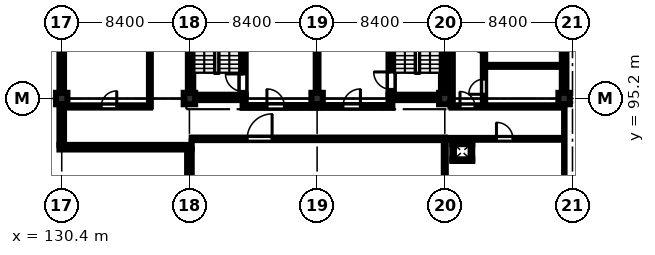
"""IFC4 building model, lengths in metres.
Left out: names, types, materials, properties, quantities, classifications, styles, units other than length and angle.
Written with IfcOpenShell. Run it as: python <this file> out.ifc"""

import sys

from ifc_helpers import new_model, si_unit, direction, frame, frame_2d, origin, origin_2d, place, context, subcontext, project, spatial, rectangle, extrude, element, fill, save


model = new_model("IFC4")
c1 = context("Model", 3, precision=1e-05, world=origin(), true_north=direction((0.0, 1.0)))
c2 = subcontext(c1, "Body", "Model", "MODEL_VIEW")
j1 = project(units=[si_unit("LENGTHUNIT", "METRE"), si_unit("PLANEANGLEUNIT", "RADIAN")], contexts=[c1])
p1 = place(None, origin())
s1 = spatial("IfcSite", under=j1, at=p1, CompositionType="ELEMENT")
p2 = place(p1, origin())
s2 = spatial("IfcBuilding", under=s1, at=p2, CompositionType="ELEMENT")
p3 = place(p2, frame((0.0, 0.0, 48.6)))
s3 = spatial("IfcBuildingStorey", under=s2, at=p3, CompositionType="ELEMENT", Elevation=48.6)
for number, where, z_axis, x_axis in (
    (1, (130.4, 95.2, 0.0), (0.0, 0.0, 1.0), (1.0, 0.0, 0.0)),
    (2, (138.8, 95.2, 0.0), (0.0, 0.0, 1.0), (1.0, 0.0, 0.0)),
    (3, (147.2, 95.2, 0.0), (0.0, 0.0, 1.0), (1.0, 0.0, 0.0)),
    (4, (155.6, 95.2, 0.0), (0.0, 0.0, 1.0), (1.0, 0.0, 0.0)),
    (5, (163.45, 95.2, 0.0), (0.0, 0.0, 1.0), (1.0, 0.0, 0.0)),
):
    element("IfcColumn", number, at=place(p3, frame(where, z_axis=z_axis, x_axis=x_axis)), inside=s3, PredefinedType="COLUMN", context=c2, shape_type="SweptSolid", body=[
        extrude(rectangle(XDim=0.75, YDim=0.75, at=origin_2d()), origin(), (0.0, 0.0, 1.0), 4.03),
    ])
p4 = place(p3, frame((138.7, 95.275, 0.0), z_axis=(0.0, 0.0, 1.0), x_axis=(1.0, 0.0, 0.0)))
e6 = element("IfcWall", 6, at=p4, inside=s3, PredefinedType="SHEAR", context=c2, shape_type="SweptSolid", body=[
    extrude(rectangle(XDim=3.8, YDim=0.35, at=frame_2d((1.9, 0.0))), origin(), (0.0, 0.0, 1.0), 4.03),
])
p5 = place(p3, frame((138.875, 95.45, 0.0), z_axis=(0.0, 0.0, 1.0), x_axis=(0.0, 1.0, 0.0)))
e7 = element("IfcWall", 7, at=p5, inside=s3, PredefinedType="SHEAR", context=c2, shape_type="SweptSolid", body=[
    extrude(rectangle(XDim=7.9, YDim=0.35, at=frame_2d((3.95, 0.0))), origin(), (0.0, 0.0, 1.0), 4.03),
])
p6 = place(p3, frame((142.325, 95.45, 0.0), z_axis=(0.0, 0.0, 1.0), x_axis=(0.0, 1.0, 0.0)))
e8 = element("IfcWall", 8, at=p6, inside=s3, PredefinedType="SHEAR", context=c2, shape_type="SweptSolid", body=[
    extrude(rectangle(XDim=7.9, YDim=0.35, at=frame_2d((3.95, 0.0))), origin(), (0.0, 0.0, 1.0), 4.03),
])
p7 = place(p6, frame((0.22, 0.0, 0.0)))
e9 = element("IfcOpeningElement", 9, at=p7, cuts=e8, PredefinedType="OPENING", context=c2, shape_type="SweptSolid", body=[
    extrude(rectangle(XDim=1.15, YDim=2.15, at=frame_2d((0.575, 1.075))), frame((0.0, 0.185, 0.0), z_axis=(0.0, -1.0, 0.0), x_axis=(1.0, 0.0, 0.0)), (0.0, 0.0, 1.0), 0.37),
])
p8 = place(p3, frame((151.9, 95.275, 0.0), z_axis=(0.0, 0.0, 1.0), x_axis=(1.0, 0.0, 0.0)))
e10 = element("IfcWall", 10, at=p8, inside=s3, PredefinedType="SHEAR", context=c2, shape_type="SweptSolid", body=[
    extrude(rectangle(XDim=3.8, YDim=0.35, at=frame_2d((1.9, 0.0))), origin(), (0.0, 0.0, 1.0), 4.03),
])
p9 = place(p3, frame((152.075, 95.45, 0.0), z_axis=(0.0, 0.0, 1.0), x_axis=(0.0, 1.0, 0.0)))
e11 = element("IfcWall", 11, at=p9, inside=s3, PredefinedType="SHEAR", context=c2, shape_type="SweptSolid", body=[
    extrude(rectangle(XDim=7.9, YDim=0.35, at=frame_2d((3.95, 0.0))), origin(), (0.0, 0.0, 1.0), 4.03),
])
p10 = place(p9, frame((0.35, 0.0, 0.0)))
e12 = element("IfcOpeningElement", 12, at=p10, cuts=e11, PredefinedType="OPENING", context=c2, shape_type="SweptSolid", body=[
    extrude(rectangle(XDim=1.15, YDim=2.15, at=frame_2d((0.575, 1.075))), frame((0.0, 0.185, 0.0), z_axis=(0.0, -1.0, 0.0), x_axis=(1.0, 0.0, 0.0)), (0.0, 0.0, 1.0), 0.37),
])
p11 = place(p3, frame((155.525, 95.45, 0.0), z_axis=(0.0, 0.0, 1.0), x_axis=(0.0, 1.0, 0.0)))
e13 = element("IfcWall", 13, at=p11, inside=s3, PredefinedType="SHEAR", context=c2, shape_type="SweptSolid", body=[
    extrude(rectangle(XDim=7.9, YDim=0.35, at=frame_2d((3.95, 0.0))), origin(), (0.0, 0.0, 1.0), 4.03),
])
p12 = place(p3, frame((163.45, 103.225, 0.0), z_axis=(0.0, 0.0, 1.0), x_axis=(0.0, -1.0, 0.0)))
e14 = element("IfcWall", 14, at=p12, inside=s3, PredefinedType="STANDARD", context=c2, shape_type="SweptSolid", body=[
    extrude(rectangle(XDim=7.65, YDim=0.3, at=frame_2d((3.825, 0.0))), origin(), (0.0, 0.0, 1.0), 3.33),
])
p13 = place(p12, frame((1.15, 0.0, 1.1)))
e15 = element("IfcOpeningElement", 15, at=p13, cuts=e14, PredefinedType="OPENING", context=c2, shape_type="SweptSolid", body=[
    extrude(rectangle(XDim=1.4, YDim=1.4, at=frame_2d((0.7, 0.7))), frame((0.0, 0.16, 0.0), z_axis=(0.0, -1.0, 0.0), x_axis=(1.0, 0.0, 0.0)), (0.0, 0.0, 1.0), 0.32),
])
p14 = place(p3, frame((130.4, 92.15, 0.0), z_axis=(0.0, 0.0, 1.0), x_axis=(0.0, 1.0, 0.0)))
e16 = element("IfcWall", 16, at=p14, inside=s3, PredefinedType="STANDARD", context=c2, shape_type="SweptSolid", body=[
    extrude(rectangle(XDim=2.675, YDim=0.3, at=frame_2d((1.337, 0.0))), origin(), (0.0, 0.0, 1.0), 4.03),
])
p15 = place(p3, frame((138.8, 87.175, 0.0), z_axis=(0.0, 0.0, 1.0), x_axis=(0.0, 1.0, 0.0)))
e17 = element("IfcWall", 17, at=p15, inside=s3, PredefinedType="STANDARD", context=c2, shape_type="SweptSolid", body=[
    extrude(rectangle(XDim=4.675, YDim=0.3, at=frame_2d((2.337, 0.0))), origin(), (0.0, 0.0, 1.0), 3.33),
])
p16 = place(p15, frame((2.4, 0.0, 0.95)))
e18 = element("IfcOpeningElement", 18, at=p16, cuts=e17, PredefinedType="OPENING", context=c2, shape_type="SweptSolid", body=[
    extrude(rectangle(XDim=1.5, YDim=1.8, at=frame_2d((0.75, 0.9))), frame((0.0, 0.16, 0.0), z_axis=(0.0, -1.0, 0.0), x_axis=(1.0, 0.0, 0.0)), (0.0, 0.0, 1.0), 0.32),
])
p17 = place(p3, frame((130.4, 95.575, 0.0), z_axis=(0.0, 0.0, 1.0), x_axis=(0.0, 1.0, 0.0)))
e19 = element("IfcWall", 19, at=p17, inside=s3, PredefinedType="STANDARD", context=c2, shape_type="SweptSolid", body=[
    extrude(rectangle(XDim=7.65, YDim=0.3, at=frame_2d((3.825, 0.0))), origin(), (0.0, 0.0, 1.0), 3.33),
])
p18 = place(p17, frame((2.4, 0.0, 1.0)))
e20 = element("IfcOpeningElement", 20, at=p18, cuts=e19, PredefinedType="OPENING", context=c2, shape_type="SweptSolid", body=[
    extrude(rectangle(XDim=1.8, YDim=1.8, at=frame_2d((0.9, 0.9))), frame((0.0, 0.16, 0.0), z_axis=(0.0, -1.0, 0.0), x_axis=(1.0, 0.0, 0.0)), (0.0, 0.0, 1.0), 0.32),
])
p19 = place(p3, frame((138.95, 92.0, 0.0), z_axis=(0.0, 0.0, 1.0), x_axis=(-1.0, 0.0, 0.0)))
e21 = element("IfcWall", 21, at=p19, inside=s3, PredefinedType="STANDARD", context=c2, shape_type="SweptSolid", body=[
    extrude(rectangle(XDim=8.7, YDim=0.3, at=frame_2d((4.35, 0.0))), origin(), (0.0, 0.0, 1.0), 4.03),
])
p20 = place(p3, frame((142.3, 94.68, 0.0), z_axis=(0.0, 0.0, 1.0), x_axis=(1.0, 0.0, 0.0)))
e22 = element("IfcWall", 22, at=p20, inside=s3, PredefinedType="STANDARD", context=c2, shape_type="SweptSolid", body=[
    extrude(rectangle(XDim=4.8, YDim=0.18, at=frame_2d((2.4, 0.0))), origin(), (0.0, 0.0, 1.0), 4.03),
])
p21 = place(p20, frame((1.6, 0.0, 0.0)))
e23 = element("IfcOpeningElement", 23, at=p21, cuts=e22, PredefinedType="OPENING", context=c2, shape_type="SweptSolid", body=[
    extrude(rectangle(XDim=1.15, YDim=2.15, at=frame_2d((0.575, 1.075))), frame((0.0, 0.1, 0.0), z_axis=(0.0, -1.0, 0.0), x_axis=(1.0, 0.0, 0.0)), (0.0, 0.0, 1.0), 0.2),
])
p22 = place(p3, frame((147.3, 94.68, 0.0), z_axis=(0.0, 0.0, 1.0), x_axis=(1.0, 0.0, 0.0)))
e24 = element("IfcWall", 24, at=p22, inside=s3, PredefinedType="STANDARD", context=c2, shape_type="SweptSolid", body=[
    extrude(rectangle(XDim=4.85, YDim=0.18, at=frame_2d((2.425, 0.0))), origin(), (0.0, 0.0, 1.0), 4.03),
])
p23 = place(p22, frame((1.6, 0.0, 0.0)))
e25 = element("IfcOpeningElement", 25, at=p23, cuts=e24, PredefinedType="OPENING", context=c2, shape_type="SweptSolid", body=[
    extrude(rectangle(XDim=1.15, YDim=2.15, at=frame_2d((0.575, 1.075))), frame((0.0, 0.1, 0.0), z_axis=(0.0, -1.0, 0.0), x_axis=(1.0, 0.0, 0.0)), (0.0, 0.0, 1.0), 0.2),
])
p24 = place(p3, frame((147.2, 95.75, 0.0), z_axis=(0.0, 0.0, 1.0), x_axis=(0.0, 1.0, 0.0)))
e26 = element("IfcWall", 26, at=p24, inside=s3, PredefinedType="STANDARD", context=c2, shape_type="SweptSolid", body=[
    extrude(rectangle(XDim=4.5, YDim=0.18, at=frame_2d((2.25, 0.0))), origin(), (0.0, 0.0, 1.0), 3.33),
])
p25 = place(p3, frame((156.05, 94.68, 0.0), z_axis=(0.0, 0.0, 1.0), x_axis=(1.0, 0.0, 0.0)))
e27 = element("IfcWall", 27, at=p25, inside=s3, PredefinedType="PARTITIONING", context=c2, shape_type="SweptSolid", body=[
    extrude(rectangle(XDim=7.15, YDim=0.15, at=frame_2d((3.575, 0.0))), origin(), (0.0, 0.0, 1.0), 4.03),
])
p26 = place(p25, frame((0.55, 0.0, 0.0)))
e28 = element("IfcOpeningElement", 28, at=p26, cuts=e27, PredefinedType="OPENING", context=c2, shape_type="SweptSolid", body=[
    extrude(rectangle(XDim=0.98, YDim=2.12, at=frame_2d((0.49, 1.06))), frame((0.0, 0.085, 0.0), z_axis=(0.0, -1.0, 0.0), x_axis=(1.0, 0.0, 0.0)), (0.0, 0.0, 1.0), 0.17),
])
p27 = place(p3, frame((158.18, 94.68, 0.0), z_axis=(0.0, 0.0, 1.0), x_axis=(0.0, 1.0, 0.0)))
e29 = element("IfcWall", 29, at=p27, inside=s3, PredefinedType="PARTITIONING", context=c2, shape_type="SweptSolid", body=[
    extrude(rectangle(XDim=8.57, YDim=0.15, at=frame_2d((4.285, 0.0))), origin(), (0.0, 0.0, 1.0), 4.03),
])
p28 = place(p27, frame((0.8, 0.0, 0.0)))
e30 = element("IfcOpeningElement", 30, at=p28, cuts=e29, PredefinedType="OPENING", context=c2, shape_type="SweptSolid", body=[
    extrude(rectangle(XDim=1.0, YDim=2.12, at=frame_2d((0.5, 1.06))), frame((0.0, 0.085, 0.0), z_axis=(0.0, -1.0, 0.0), x_axis=(1.0, 0.0, 0.0)), (0.0, 0.0, 1.0), 0.17),
])
p29 = place(p27, frame((3.5, 0.0, 0.0)))
e31 = element("IfcOpeningElement", 31, at=p29, cuts=e29, PredefinedType="OPENING", context=c2, shape_type="SweptSolid", body=[
    extrude(rectangle(XDim=0.92, YDim=2.1, at=frame_2d((0.46, 1.05))), frame((0.0, 0.085, 0.0), z_axis=(0.0, -1.0, 0.0), x_axis=(1.0, 0.0, 0.0)), (0.0, 0.0, 1.0), 0.17),
])
p30 = place(p27, frame((6.4, 0.0, 0.0)))
e32 = element("IfcOpeningElement", 32, at=p30, cuts=e29, PredefinedType="OPENING", context=c2, shape_type="SweptSolid", body=[
    extrude(rectangle(XDim=0.92, YDim=2.1, at=frame_2d((0.46, 1.05))), frame((0.0, 0.085, 0.0), z_axis=(0.0, -1.0, 0.0), x_axis=(1.0, 0.0, 0.0)), (0.0, 0.0, 1.0), 0.17),
])
p31 = place(p3, frame((158.18, 97.35, 0.0), z_axis=(0.0, 0.0, 1.0), x_axis=(1.0, 0.0, 0.0)))
e33 = element("IfcWall", 33, at=p31, inside=s3, PredefinedType="PARTITIONING", context=c2, shape_type="SweptSolid", body=[
    extrude(rectangle(XDim=5.02, YDim=0.128, at=frame_2d((2.51, 0.0))), origin(), (0.0, 0.0, 1.0), 4.03),
])
p32 = place(p3, frame((156.05, 94.68, 0.0), z_axis=(0.0, 0.0, 1.0), x_axis=(0.0, 1.0, 0.0)))
e34 = element("IfcWall", 34, at=p32, inside=s3, PredefinedType="PARTITIONING", context=c2, shape_type="SweptSolid", body=[
    extrude(rectangle(XDim=8.57, YDim=0.15, at=frame_2d((4.285, 0.0))), origin(), (0.0, 0.0, 1.0), 4.03),
])
p33 = place(p3, frame((136.2, 94.68, 0.0), z_axis=(0.0, 0.0, 1.0), x_axis=(0.0, 1.0, 0.0)))
e35 = element("IfcWall", 35, at=p33, inside=s3, PredefinedType="PARTITIONING", context=c2, shape_type="SweptSolid", body=[
    extrude(rectangle(XDim=9.07, YDim=0.12, at=frame_2d((4.535, 0.0))), origin(), (0.0, 0.0, 1.0), 4.03),
])
p34 = place(p3, frame((130.8, 94.68, 0.0), z_axis=(0.0, 0.0, 1.0), x_axis=(1.0, 0.0, 0.0)))
e36 = element("IfcWall", 36, at=p34, inside=s3, PredefinedType="PARTITIONING", context=c2, shape_type="SweptSolid", body=[
    extrude(rectangle(XDim=5.4, YDim=0.145, at=frame_2d((2.7, 0.0))), origin(), (0.0, 0.0, 1.0), 4.03),
])
p35 = place(p34, frame((2.2, 0.0, 0.0)))
e37 = element("IfcOpeningElement", 37, at=p35, cuts=e36, PredefinedType="OPENING", context=c2, shape_type="SweptSolid", body=[
    extrude(rectangle(XDim=1.02, YDim=2.15, at=frame_2d((0.51, 1.075))), frame((0.0, 0.083, 0.0), z_axis=(0.0, -1.0, 0.0), x_axis=(1.0, 0.0, 0.0)), (0.0, 0.0, 1.0), 0.165),
])
p36 = place(p3, frame((138.95, 92.55, 0.0), z_axis=(0.0, 0.0, 1.0), x_axis=(1.0, 0.0, 0.0)))
e38 = element("IfcWall", 38, at=p36, inside=s3, PredefinedType="PARTITIONING", context=c2, shape_type="SweptSolid", body=[
    extrude(rectangle(XDim=16.65, YDim=0.165, at=frame_2d((8.325, 0.0))), origin(), (0.0, 0.0, 1.0), 4.03),
])
p37 = place(p36, frame((3.65, 0.0, 0.0)))
e39 = element("IfcOpeningElement", 39, at=p37, cuts=e38, PredefinedType="OPENING", context=c2, shape_type="SweptSolid", body=[
    extrude(rectangle(XDim=1.64, YDim=2.24, at=frame_2d((0.82, 1.12))), frame((0.0, 0.093, 0.0), z_axis=(0.0, -1.0, 0.0), x_axis=(1.0, 0.0, 0.0)), (0.0, 0.0, 1.0), 0.185),
])
p38 = place(p3, frame((155.6, 92.55, 0.0), z_axis=(0.0, 0.0, 1.0), x_axis=(1.0, 0.0, 0.0)))
e40 = element("IfcWall", 40, at=p38, inside=s3, PredefinedType="PARTITIONING", context=c2, shape_type="SweptSolid", body=[
    extrude(rectangle(XDim=7.75, YDim=0.12, at=frame_2d((3.875, 0.0))), origin(), (0.0, 0.0, 1.0), 4.03),
])
p39 = place(p38, frame((3.4, 0.0, 0.0)))
e41 = element("IfcOpeningElement", 41, at=p39, cuts=e40, PredefinedType="OPENING", context=c2, shape_type="SweptSolid", body=[
    extrude(rectangle(XDim=1.08, YDim=2.15, at=frame_2d((0.54, 1.075))), frame((0.0, 0.07, 0.0), z_axis=(0.0, -1.0, 0.0), x_axis=(1.0, 0.0, 0.0)), (0.0, 0.0, 1.0), 0.14),
])
p40 = place(p3, frame((155.6, 78.55, 0.0), z_axis=(0.0, 0.0, 1.0), x_axis=(0.0, 1.0, 0.0)))
e42 = element("IfcWall", 42, at=p40, inside=s3, PredefinedType="PARTITIONING", context=c2, shape_type="SweptSolid", body=[
    extrude(rectangle(XDim=14.0, YDim=0.128, at=frame_2d((7.0, 0.0))), origin(), (0.0, 0.0, 1.0), 3.33),
])
for number, where, z_axis, x_axis in (
    (43, (156.095, 91.147, 0.0), (0.0, 0.0, 1.0), (1.0, 0.0, 0.0)),
    (44, (156.095, 92.252, 0.0), (0.0, 0.0, 1.0), (1.0, 0.0, 0.0)),
):
    element("IfcWall", number, at=place(p3, frame(where, z_axis=z_axis, x_axis=x_axis)), inside=s3, PredefinedType="PARTITIONING", context=c2, shape_type="SweptSolid", body=[
        extrude(rectangle(XDim=1.31, YDim=0.105, at=frame_2d((0.655, 0.0))), origin(), (0.0, 0.0, 1.0), 4.03),
    ])
for number, where, z_axis, x_axis in (
    (45, (156.147, 91.2, 0.0), (0.0, 0.0, 1.0), (0.0, 1.0, 0.0)),
    (46, (157.353, 91.2, 0.0), (0.0, 0.0, 1.0), (0.0, 1.0, 0.0)),
):
    element("IfcWall", number, at=place(p3, frame(where, z_axis=z_axis, x_axis=x_axis)), inside=s3, PredefinedType="PARTITIONING", context=c2, shape_type="SweptSolid", body=[
        extrude(rectangle(XDim=1.0, YDim=0.105, at=frame_2d((0.5, 0.0))), origin(), (0.0, 0.0, 1.0), 4.03),
    ])
p41 = place(p16, origin())
e47 = element("IfcWindow", 47, at=p41, inside=s3, PartitioningType="DOUBLE_PANEL_VERTICAL", PredefinedType="WINDOW", context=c2, shape_type="SweptSolid", body=[
    extrude(rectangle(XDim=1.5, YDim=1.8, at=frame_2d((0.75, 0.9))), frame((0.0, 0.03, 0.0), z_axis=(0.0, -1.0, 0.0), x_axis=(1.0, 0.0, 0.0)), (0.0, 0.0, 1.0), 0.06),
])
fill(e18, e47)
p42 = place(p18, origin())
e48 = element("IfcWindow", 48, at=p42, inside=s3, PartitioningType="DOUBLE_PANEL_VERTICAL", PredefinedType="WINDOW", context=c2, shape_type="SweptSolid", body=[
    extrude(rectangle(XDim=1.8, YDim=1.8, at=frame_2d((0.9, 0.9))), frame((0.0, 0.03, 0.0), z_axis=(0.0, -1.0, 0.0), x_axis=(1.0, 0.0, 0.0)), (0.0, 0.0, 1.0), 0.06),
])
fill(e20, e48)
p43 = place(p21, origin())
e49 = element("IfcDoor", 49, at=p43, inside=s3, OperationType="SINGLE_SWING_LEFT", PredefinedType="DOOR", context=c2, shape_type="SweptSolid", body=[
    extrude(rectangle(XDim=1.15, YDim=2.15, at=frame_2d((0.575, 1.075))), frame((0.0, 0.025, 0.0), z_axis=(0.0, -1.0, 0.0), x_axis=(1.0, 0.0, 0.0)), (0.0, 0.0, 1.0), 0.05),
])
fill(e23, e49)
p44 = place(p23, origin())
e50 = element("IfcDoor", 50, at=p44, inside=s3, OperationType="SINGLE_SWING_RIGHT", PredefinedType="DOOR", context=c2, shape_type="SweptSolid", body=[
    extrude(rectangle(XDim=1.15, YDim=2.15, at=frame_2d((0.575, 1.075))), frame((0.0, 0.025, 0.0), z_axis=(0.0, -1.0, 0.0), x_axis=(1.0, 0.0, 0.0)), (0.0, 0.0, 1.0), 0.05),
])
fill(e25, e50)
p45 = place(p26, origin())
e51 = element("IfcDoor", 51, at=p45, inside=s3, OperationType="SINGLE_SWING_LEFT", PredefinedType="DOOR", context=c2, shape_type="SweptSolid", body=[
    extrude(rectangle(XDim=0.98, YDim=2.12, at=frame_2d((0.49, 1.06))), frame((0.0, 0.025, 0.0), z_axis=(0.0, -1.0, 0.0), x_axis=(1.0, 0.0, 0.0)), (0.0, 0.0, 1.0), 0.05),
])
fill(e28, e51)
p46 = place(p28, origin())
e52 = element("IfcDoor", 52, at=p46, inside=s3, OperationType="SINGLE_SWING_LEFT", PredefinedType="DOOR", context=c2, shape_type="SweptSolid", body=[
    extrude(rectangle(XDim=1.0, YDim=2.12, at=frame_2d((0.5, 1.06))), frame((0.0, 0.025, 0.0), z_axis=(0.0, -1.0, 0.0), x_axis=(1.0, 0.0, 0.0)), (0.0, 0.0, 1.0), 0.05),
])
fill(e30, e52)
p47 = place(p29, origin())
e53 = element("IfcDoor", 53, at=p47, inside=s3, OperationType="SINGLE_SWING_RIGHT", PredefinedType="DOOR", context=c2, shape_type="SweptSolid", body=[
    extrude(rectangle(XDim=0.92, YDim=2.1, at=frame_2d((0.46, 1.05))), frame((0.0, 0.025, 0.0), z_axis=(0.0, -1.0, 0.0), x_axis=(1.0, 0.0, 0.0)), (0.0, 0.0, 1.0), 0.05),
])
fill(e31, e53)
p48 = place(p35, origin())
e54 = element("IfcDoor", 54, at=p48, inside=s3, OperationType="SINGLE_SWING_RIGHT", PredefinedType="DOOR", context=c2, shape_type="SweptSolid", body=[
    extrude(rectangle(XDim=1.02, YDim=2.15, at=frame_2d((0.51, 1.075))), frame((0.0, 0.025, 0.0), z_axis=(0.0, -1.0, 0.0), x_axis=(1.0, 0.0, 0.0)), (0.0, 0.0, 1.0), 0.05),
])
fill(e37, e54)
p49 = place(p37, origin())
e55 = element("IfcDoor", 55, at=p49, inside=s3, OperationType="SINGLE_SWING_RIGHT", PredefinedType="DOOR", context=c2, shape_type="SweptSolid", body=[
    extrude(rectangle(XDim=1.64, YDim=2.24, at=frame_2d((0.82, 1.12))), frame((0.0, 0.025, 0.0), z_axis=(0.0, -1.0, 0.0), x_axis=(1.0, 0.0, 0.0)), (0.0, 0.0, 1.0), 0.05),
])
fill(e39, e55)
p50 = place(p39, origin())
e56 = element("IfcDoor", 56, at=p50, inside=s3, OperationType="SINGLE_SWING_LEFT", PredefinedType="DOOR", context=c2, shape_type="SweptSolid", body=[
    extrude(rectangle(XDim=1.08, YDim=2.15, at=frame_2d((0.54, 1.075))), frame((0.0, 0.025, 0.0), z_axis=(0.0, -1.0, 0.0), x_axis=(1.0, 0.0, 0.0)), (0.0, 0.0, 1.0), 0.05),
])
fill(e41, e56)
p51 = place(p7, origin())
e57 = element("IfcDoor", 57, at=p51, inside=s3, OperationType="SINGLE_SWING_RIGHT", PredefinedType="DOOR", context=c2, shape_type="SweptSolid", body=[
    extrude(rectangle(XDim=1.15, YDim=2.15, at=frame_2d((0.575, 1.075))), frame((0.0, 0.025, 0.0), z_axis=(0.0, -1.0, 0.0), x_axis=(1.0, 0.0, 0.0)), (0.0, 0.0, 1.0), 0.05),
])
fill(e9, e57)
p52 = place(p10, origin())
e58 = element("IfcDoor", 58, at=p52, inside=s3, OperationType="SINGLE_SWING_RIGHT", PredefinedType="DOOR", context=c2, shape_type="SweptSolid", body=[
    extrude(rectangle(XDim=1.15, YDim=2.15, at=frame_2d((0.575, 1.075))), frame((0.0, 0.025, 0.0), z_axis=(0.0, -1.0, 0.0), x_axis=(1.0, 0.0, 0.0)), (0.0, 0.0, 1.0), 0.05),
])
fill(e12, e58)
save(model, sys.argv[1])
